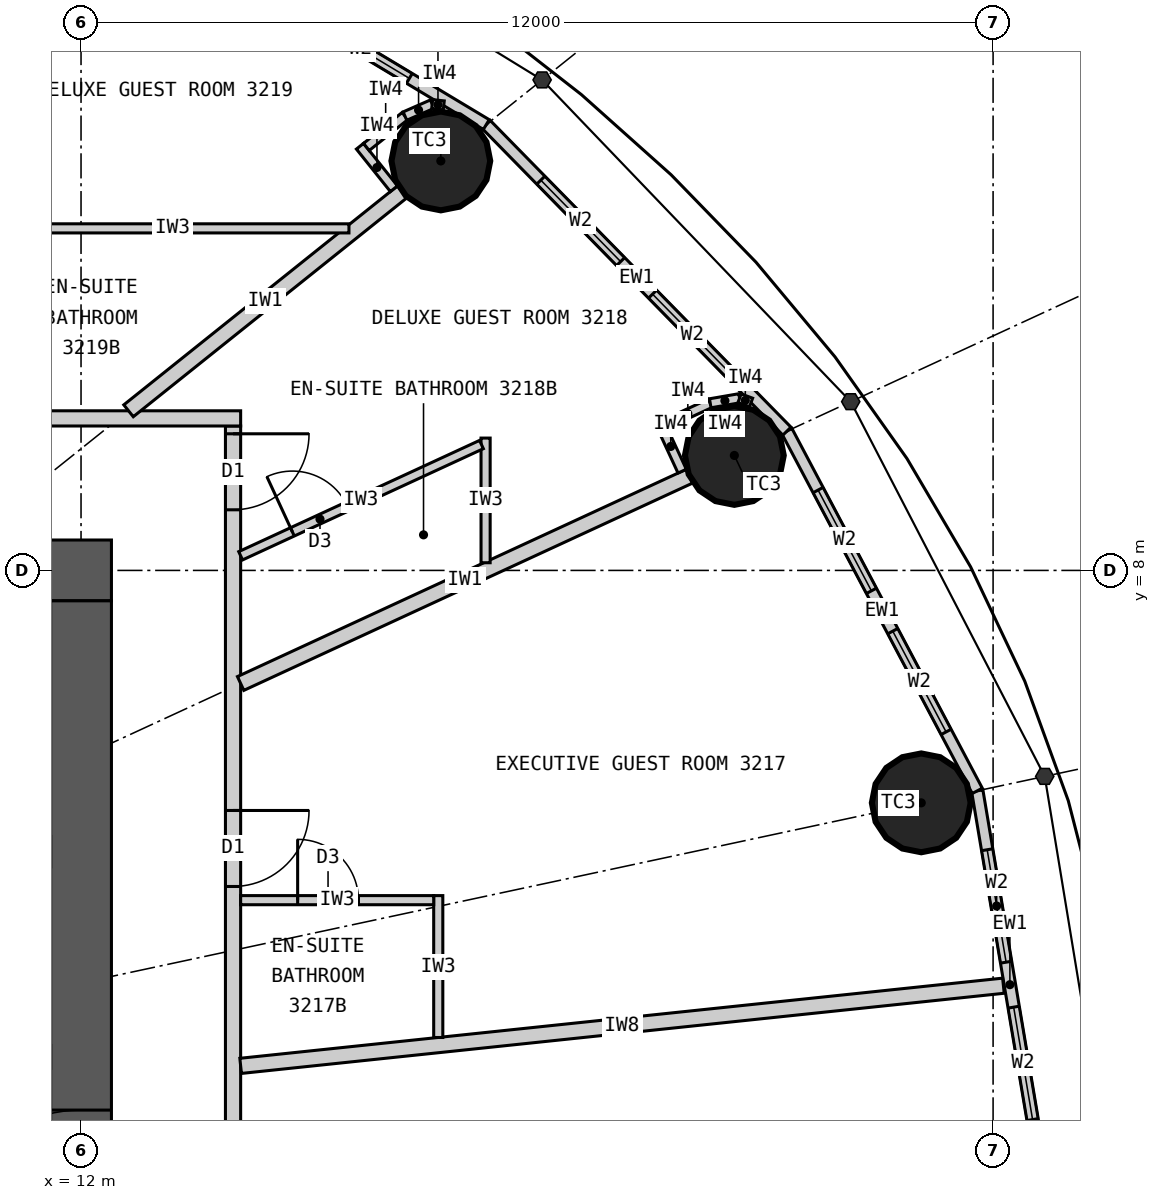
"""IFC4 building model, lengths in metres.
Left out: names, types, materials, properties, quantities, classifications, styles, units other than length and angle.
Written with IfcOpenShell. Run it as: python <this file> out.ifc"""

import sys

from ifc_helpers import new_model, si_unit, direction, frame, frame_2d, origin, origin_2d, place, context, subcontext, project, spatial, rectangle, circle, extrude, element, fill, save


model = new_model("IFC4")
c1 = context("Model", 3, precision=1e-05, world=origin(), true_north=direction((0.0, 1.0)))
c2 = subcontext(c1, "Body", "Model", "MODEL_VIEW")
j1 = project(units=[si_unit("LENGTHUNIT", "METRE"), si_unit("PLANEANGLEUNIT", "RADIAN")], contexts=[c1])
p1 = place(None, origin())
s1 = spatial("IfcSite", under=j1, at=p1, CompositionType="ELEMENT")
p2 = place(p1, origin())
s2 = spatial("IfcBuilding", under=s1, at=p2, CompositionType="ELEMENT")
p3 = place(p2, frame((0.0, 0.0, 125.4)))
s3 = spatial("IfcBuildingStorey", under=s2, at=p3, CompositionType="ELEMENT", Elevation=125.4)
for number, where, z_axis, x_axis in (
    (1, (23.055, 4.942, 0.0), (0.0, 0.0, 1.0), (1.0, 0.0, 0.0)),
    (2, (20.596, 9.513, 0.0), (0.0, 0.0, 1.0), (1.0, 0.0, 0.0)),
    (3, (16.734, 13.387, 0.0), (0.0, 0.0, 1.0), (1.0, 0.0, 0.0)),
):
    element("IfcColumn", number, at=place(p3, frame(where, z_axis=z_axis, x_axis=x_axis)), inside=s3, PredefinedType="COLUMN", context=c2, shape_type="SweptSolid", body=[
        extrude(circle(Radius=0.65, at=origin_2d()), origin(), (0.0, 0.0, 1.0), 3.3),
    ])
p4 = place(p3, frame((-12.4, 8.0, 0.0), z_axis=(0.0, 0.0, 1.0), x_axis=(1.0, 0.0, 0.0)))
e4 = element("IfcWall", 4, at=p4, inside=s3, PredefinedType="SHEAR", context=c2, shape_type="SweptSolid", body=[
    extrude(rectangle(XDim=24.8, YDim=0.8, at=frame_2d((12.4, 0.0))), origin(), (0.0, 0.0, 1.0), 3.3),
])
p5 = place(p4, frame((11.1, 0.0, 0.0)))
e5 = element("IfcOpeningElement", 5, at=p5, cuts=e4, PredefinedType="OPENING", context=c2, shape_type="SweptSolid", body=[
    extrude(rectangle(XDim=1.2, YDim=2.2, at=frame_2d((0.6, 1.1))), frame((0.0, 0.41, 0.0), z_axis=(0.0, -1.0, 0.0), x_axis=(1.0, 0.0, 0.0)), (0.0, 0.0, 1.0), 0.82),
])
p6 = place(p4, frame((18.7, 0.0, 0.0)))
e6 = element("IfcOpeningElement", 6, at=p6, cuts=e4, PredefinedType="OPENING", context=c2, shape_type="SweptSolid", body=[
    extrude(rectangle(XDim=0.9, YDim=2.2, at=frame_2d((0.45, 1.1))), frame((0.0, 0.41, 0.0), z_axis=(0.0, -1.0, 0.0), x_axis=(1.0, 0.0, 0.0)), (0.0, 0.0, 1.0), 0.82),
])
p7 = place(p3, frame((12.0, -7.6, 0.0), z_axis=(0.0, 0.0, 1.0), x_axis=(0.0, 1.0, 0.0)))
e7 = element("IfcWall", 7, at=p7, inside=s3, PredefinedType="SHEAR", context=c2, shape_type="SweptSolid", body=[
    extrude(rectangle(XDim=15.2, YDim=0.8, at=frame_2d((7.6, 0.0))), origin(), (0.0, 0.0, 1.0), 3.3),
])
p8 = place(p7, frame((6.7, 0.0, 0.0)))
e8 = element("IfcOpeningElement", 8, at=p8, cuts=e7, PredefinedType="OPENING", context=c2, shape_type="SweptSolid", body=[
    extrude(rectangle(XDim=1.8, YDim=2.2, at=frame_2d((0.9, 1.1))), frame((0.0, 0.41, 0.0), z_axis=(0.0, -1.0, 0.0), x_axis=(1.0, 0.0, 0.0)), (0.0, 0.0, 1.0), 0.82),
])
p9 = place(p3, frame((24.65, 0.0, 0.0), z_axis=(0.0, 0.0, 1.0), x_axis=(-0.165883894218, 0.986145290329, 0.0)))
e9 = element("IfcWall", 9, at=p9, inside=s3, PredefinedType="ELEMENTEDWALL", context=c2, shape_type="SweptSolid", body=[
    extrude(rectangle(XDim=5.172, YDim=0.15, at=frame_2d((2.586, 0.0))), origin(), (0.0, 0.0, 1.0), 3.12),
])
p10 = place(p9, frame((0.786, 0.0, 0.9)))
e10 = element("IfcOpeningElement", 10, at=p10, cuts=e9, PredefinedType="OPENING", context=c2, shape_type="SweptSolid", body=[
    extrude(rectangle(XDim=1.5, YDim=1.9, at=frame_2d((0.75, 0.95))), frame((0.0, 0.085, 0.0), z_axis=(0.0, -1.0, 0.0), x_axis=(1.0, 0.0, 0.0)), (0.0, 0.0, 1.0), 0.17),
])
p11 = place(p9, frame((2.886, 0.0, 0.9)))
e11 = element("IfcOpeningElement", 11, at=p11, cuts=e9, PredefinedType="OPENING", context=c2, shape_type="SweptSolid", body=[
    extrude(rectangle(XDim=1.5, YDim=1.9, at=frame_2d((0.75, 0.95))), frame((0.0, 0.085, 0.0), z_axis=(0.0, -1.0, 0.0), x_axis=(1.0, 0.0, 0.0)), (0.0, 0.0, 1.0), 0.17),
])
p12 = place(p3, frame((23.792, 5.1, 0.0), z_axis=(0.0, 0.0, 1.0), x_axis=(-0.467814388454, 0.883826735257, 0.0)))
e12 = element("IfcWall", 12, at=p12, inside=s3, PredefinedType="ELEMENTEDWALL", context=c2, shape_type="SweptSolid", body=[
    extrude(rectangle(XDim=5.354, YDim=0.15, at=frame_2d((2.677, 0.0))), origin(), (0.0, 0.0, 1.0), 3.12),
])
p13 = place(p12, frame((0.877, 0.0, 0.9)))
e13 = element("IfcOpeningElement", 13, at=p13, cuts=e12, PredefinedType="OPENING", context=c2, shape_type="SweptSolid", body=[
    extrude(rectangle(XDim=1.5, YDim=1.9, at=frame_2d((0.75, 0.95))), frame((0.0, 0.085, 0.0), z_axis=(0.0, -1.0, 0.0), x_axis=(1.0, 0.0, 0.0)), (0.0, 0.0, 1.0), 0.17),
])
p14 = place(p12, frame((2.977, 0.0, 0.9)))
e14 = element("IfcOpeningElement", 14, at=p14, cuts=e12, PredefinedType="OPENING", context=c2, shape_type="SweptSolid", body=[
    extrude(rectangle(XDim=1.5, YDim=1.9, at=frame_2d((0.75, 0.95))), frame((0.0, 0.085, 0.0), z_axis=(0.0, -1.0, 0.0), x_axis=(1.0, 0.0, 0.0)), (0.0, 0.0, 1.0), 0.17),
])
p15 = place(p3, frame((21.287, 9.832, 0.0), z_axis=(0.0, 0.0, 1.0), x_axis=(-0.700136650834, 0.714008872605, 0.0)))
e15 = element("IfcWall", 15, at=p15, inside=s3, PredefinedType="ELEMENTEDWALL", context=c2, shape_type="SweptSolid", body=[
    extrude(rectangle(XDim=5.649, YDim=0.15, at=frame_2d((2.825, 0.0))), origin(), (0.0, 0.0, 1.0), 3.12),
])
p16 = place(p15, frame((1.025, 0.0, 0.9)))
e16 = element("IfcOpeningElement", 16, at=p16, cuts=e15, PredefinedType="OPENING", context=c2, shape_type="SweptSolid", body=[
    extrude(rectangle(XDim=1.5, YDim=1.9, at=frame_2d((0.75, 0.95))), frame((0.0, 0.085, 0.0), z_axis=(0.0, -1.0, 0.0), x_axis=(1.0, 0.0, 0.0)), (0.0, 0.0, 1.0), 0.17),
])
p17 = place(p15, frame((3.125, 0.0, 0.9)))
e17 = element("IfcOpeningElement", 17, at=p17, cuts=e15, PredefinedType="OPENING", context=c2, shape_type="SweptSolid", body=[
    extrude(rectangle(XDim=1.5, YDim=1.9, at=frame_2d((0.75, 0.95))), frame((0.0, 0.085, 0.0), z_axis=(0.0, -1.0, 0.0), x_axis=(1.0, 0.0, 0.0)), (0.0, 0.0, 1.0), 0.17),
])
p18 = place(p3, frame((17.332, 13.866, 0.0), z_axis=(0.0, 0.0, 1.0), x_axis=(-0.857308573723, 0.514802884044, 0.0)))
e18 = element("IfcWall", 18, at=p18, inside=s3, PredefinedType="ELEMENTEDWALL", context=c2, shape_type="SweptSolid", body=[
    extrude(rectangle(XDim=5.961, YDim=0.15, at=frame_2d((2.98, 0.0))), origin(), (0.0, 0.0, 1.0), 3.12),
])
p19 = place(p18, frame((1.181, 0.0, 0.9)))
e19 = element("IfcOpeningElement", 19, at=p19, cuts=e18, PredefinedType="OPENING", context=c2, shape_type="SweptSolid", body=[
    extrude(rectangle(XDim=1.5, YDim=1.9, at=frame_2d((0.75, 0.95))), frame((0.0, 0.085, 0.0), z_axis=(0.0, -1.0, 0.0), x_axis=(1.0, 0.0, 0.0)), (0.0, 0.0, 1.0), 0.17),
])
p20 = place(p18, frame((3.281, 0.0, 0.9)))
e20 = element("IfcOpeningElement", 20, at=p20, cuts=e18, PredefinedType="OPENING", context=c2, shape_type="SweptSolid", body=[
    extrude(rectangle(XDim=1.5, YDim=1.9, at=frame_2d((0.75, 0.95))), frame((0.0, 0.085, 0.0), z_axis=(0.0, -1.0, 0.0), x_axis=(1.0, 0.0, 0.0)), (0.0, 0.0, 1.0), 0.17),
])
p21 = place(p3, frame((14.0, -9.9, 0.0), z_axis=(0.0, 0.0, 1.0), x_axis=(0.0, 1.0, 0.0)))
e21 = element("IfcWall", 21, at=p21, inside=s3, PredefinedType="PARTITIONING", context=c2, shape_type="SweptSolid", body=[
    extrude(rectangle(XDim=19.8, YDim=0.2, at=frame_2d((9.9, 0.0))), origin(), (0.0, 0.0, 1.0), 3.12),
])
p22 = place(p21, frame((2.478, 0.0, 0.0)))
e22 = element("IfcOpeningElement", 22, at=p22, cuts=e21, PredefinedType="OPENING", context=c2, shape_type="SweptSolid", body=[
    extrude(rectangle(XDim=1.0, YDim=2.2, at=frame_2d((0.5, 1.1))), frame((0.0, 0.11, 0.0), z_axis=(0.0, -1.0, 0.0), x_axis=(1.0, 0.0, 0.0)), (0.0, 0.0, 1.0), 0.22),
])
p23 = place(p21, frame((8.838, 0.0, 0.0)))
e23 = element("IfcOpeningElement", 23, at=p23, cuts=e21, PredefinedType="OPENING", context=c2, shape_type="SweptSolid", body=[
    extrude(rectangle(XDim=1.0, YDim=2.2, at=frame_2d((0.5, 1.1))), frame((0.0, 0.11, 0.0), z_axis=(0.0, -1.0, 0.0), x_axis=(1.0, 0.0, 0.0)), (0.0, 0.0, 1.0), 0.22),
])
p24 = place(p21, frame((13.742, 0.0, 0.0)))
e24 = element("IfcOpeningElement", 24, at=p24, cuts=e21, PredefinedType="OPENING", context=c2, shape_type="SweptSolid", body=[
    extrude(rectangle(XDim=1.0, YDim=2.2, at=frame_2d((0.5, 1.1))), frame((0.0, 0.11, 0.0), z_axis=(0.0, -1.0, 0.0), x_axis=(1.0, 0.0, 0.0)), (0.0, 0.0, 1.0), 0.22),
])
p25 = place(p21, frame((18.698, 0.0, 0.0)))
e25 = element("IfcOpeningElement", 25, at=p25, cuts=e21, PredefinedType="OPENING", context=c2, shape_type="SweptSolid", body=[
    extrude(rectangle(XDim=1.0, YDim=2.2, at=frame_2d((0.5, 1.1))), frame((0.0, 0.11, 0.0), z_axis=(0.0, -1.0, 0.0), x_axis=(1.0, 0.0, 0.0)), (0.0, 0.0, 1.0), 0.22),
])
p26 = place(p3, frame((3.283, 10.0, 0.0), z_axis=(0.0, 0.0, 1.0), x_axis=(1.0, 0.0, 0.0)))
e26 = element("IfcWall", 26, at=p26, inside=s3, PredefinedType="PARTITIONING", context=c2, shape_type="SweptSolid", body=[
    extrude(rectangle(XDim=10.817, YDim=0.2, at=frame_2d((5.409, 0.0))), origin(), (0.0, 0.0, 1.0), 3.12),
])
p27 = place(p26, frame((6.482, 0.0, 0.0)))
e27 = element("IfcOpeningElement", 27, at=p27, cuts=e26, PredefinedType="OPENING", context=c2, shape_type="SweptSolid", body=[
    extrude(rectangle(XDim=1.0, YDim=2.2, at=frame_2d((0.5, 1.1))), frame((0.0, 0.11, 0.0), z_axis=(0.0, -1.0, 0.0), x_axis=(1.0, 0.0, 0.0)), (0.0, 0.0, 1.0), 0.22),
])
p28 = place(p3, frame((14.1, 1.482, 0.0), z_axis=(0.0, 0.0, 1.0), x_axis=(0.994523202615, 0.104516024894, 0.0)))
e28 = element("IfcWall", 28, at=p28, inside=s3, PredefinedType="PARTITIONING", context=c2, shape_type="SweptSolid", body=[
    extrude(rectangle(XDim=10.091, YDim=0.2, at=frame_2d((5.045, 0.0))), origin(), (0.0, 0.0, 1.0), 2.47),
])
p29 = place(p3, frame((14.1, 6.512, 0.0), z_axis=(0.0, 0.0, 1.0), x_axis=(0.907833019998, 0.419331858797, 0.0)))
e29 = element("IfcWall", 29, at=p29, inside=s3, PredefinedType="PARTITIONING", context=c2, shape_type="SweptSolid", body=[
    extrude(rectangle(XDim=6.505, YDim=0.2, at=frame_2d((3.252, 0.0))), origin(), (0.0, 0.0, 1.0), 2.27),
])
p30 = place(p3, frame((12.625, 10.1, 0.0), z_axis=(0.0, 0.0, 1.0), x_axis=(0.780863644897, 0.624701503182, 0.0)))
e30 = element("IfcWall", 30, at=p30, inside=s3, PredefinedType="PARTITIONING", context=c2, shape_type="SweptSolid", body=[
    extrude(rectangle(XDim=4.612, YDim=0.2, at=frame_2d((2.306, 0.0))), origin(), (0.0, 0.0, 1.0), 2.37),
])
p31 = place(p3, frame((16.7, 1.855, 0.0), z_axis=(0.0, 0.0, 1.0), x_axis=(0.0, 1.0, 0.0)))
e31 = element("IfcWall", 31, at=p31, inside=s3, PredefinedType="PARTITIONING", context=c2, shape_type="SweptSolid", body=[
    extrude(rectangle(XDim=1.867, YDim=0.12, at=frame_2d((0.933, 0.0))), origin(), (0.0, 0.0, 1.0), 3.12),
])
p32 = place(p3, frame((14.1, 3.662, 0.0), z_axis=(0.0, 0.0, 1.0), x_axis=(1.0, 0.0, 0.0)))
e32 = element("IfcWall", 32, at=p32, inside=s3, PredefinedType="PARTITIONING", context=c2, shape_type="SweptSolid", body=[
    extrude(rectangle(XDim=2.54, YDim=0.12, at=frame_2d((1.27, 0.0))), origin(), (0.0, 0.0, 1.0), 2.37),
])
p33 = place(p32, frame((0.75, 0.0, 0.0)))
e33 = element("IfcOpeningElement", 33, at=p33, cuts=e32, PredefinedType="OPENING", context=c2, shape_type="SweptSolid", body=[
    extrude(rectangle(XDim=0.8, YDim=2.1, at=frame_2d((0.4, 1.05))), frame((0.0, 0.07, 0.0), z_axis=(0.0, -1.0, 0.0), x_axis=(1.0, 0.0, 0.0)), (0.0, 0.0, 1.0), 0.14),
])
p34 = place(p3, frame((17.323, 8.101, 0.0), z_axis=(0.0, 0.0, 1.0), x_axis=(0.0, 1.0, 0.0)))
e34 = element("IfcWall", 34, at=p34, inside=s3, PredefinedType="PARTITIONING", context=c2, shape_type="SweptSolid", body=[
    extrude(rectangle(XDim=1.64, YDim=0.12, at=frame_2d((0.82, 0.0))), origin(), (0.0, 0.0, 1.0), 3.12),
])
p35 = place(p3, frame((14.1, 8.193, 0.0), z_axis=(0.0, 0.0, 1.0), x_axis=(0.907836493557, 0.419324338628, 0.0)))
e35 = element("IfcWall", 35, at=p35, inside=s3, PredefinedType="PARTITIONING", context=c2, shape_type="SweptSolid", body=[
    extrude(rectangle(XDim=3.49, YDim=0.12, at=frame_2d((1.745, 0.0))), origin(), (0.0, 0.0, 1.0), 3.12),
])
p36 = place(p35, frame((0.75, 0.0, 0.0)))
e36 = element("IfcOpeningElement", 36, at=p36, cuts=e35, PredefinedType="OPENING", context=c2, shape_type="SweptSolid", body=[
    extrude(rectangle(XDim=0.8, YDim=2.1, at=frame_2d((0.4, 1.05))), frame((0.0, 0.07, 0.0), z_axis=(0.0, -1.0, 0.0), x_axis=(1.0, 0.0, 0.0)), (0.0, 0.0, 1.0), 0.14),
])
p37 = place(p3, frame((15.525, 12.5, 0.0), z_axis=(0.0, 0.0, 1.0), x_axis=(-1.0, 0.0, 0.0)))
e37 = element("IfcWall", 37, at=p37, inside=s3, PredefinedType="PARTITIONING", context=c2, shape_type="SweptSolid", body=[
    extrude(rectangle(XDim=4.64, YDim=0.12, at=frame_2d((2.32, 0.0))), origin(), (0.0, 0.0, 1.0), 3.12),
])
p38 = place(p3, frame((19.909, 9.306, 0.0), z_axis=(0.0, 0.0, 1.0), x_axis=(-0.419296148934, 0.90784951368, 0.0)))
e38 = element("IfcWall", 38, at=p38, inside=s3, PredefinedType="PARTITIONING", context=c2, shape_type="SweptSolid", body=[
    extrude(rectangle(XDim=0.716, YDim=0.12, at=frame_2d((0.358, 0.0))), origin(), (0.0, 0.0, 1.0), 3.12),
])
p39 = place(p3, frame((19.689, 9.926, 0.0), z_axis=(0.0, 0.0, 1.0), x_axis=(0.907893409272, 0.419201094227, 0.0)))
e39 = element("IfcWall", 39, at=p39, inside=s3, PredefinedType="PARTITIONING", context=c2, shape_type="SweptSolid", body=[
    extrude(rectangle(XDim=0.65, YDim=0.12, at=frame_2d((0.325, 0.0))), origin(), (0.0, 0.0, 1.0), 3.12),
])
p40 = place(p3, frame((20.279, 10.199, 0.0), z_axis=(0.0, 0.0, 1.0), x_axis=(0.985380740712, 0.170366651181, 0.0)))
e40 = element("IfcWall", 40, at=p40, inside=s3, PredefinedType="PARTITIONING", context=c2, shape_type="SweptSolid", body=[
    extrude(rectangle(XDim=0.391, YDim=0.12, at=frame_2d((0.196, 0.0))), origin(), (0.0, 0.0, 1.0), 3.12),
])
p41 = place(p3, frame((20.664, 10.265, 0.0), z_axis=(0.0, 0.0, 1.0), x_axis=(0.938058651481, -0.346476501918, 0.0)))
e41 = element("IfcWall", 41, at=p41, inside=s3, PredefinedType="PARTITIONING", context=c2, shape_type="SweptSolid", body=[
    extrude(rectangle(XDim=0.161, YDim=0.12, at=frame_2d((0.081, 0.0))), origin(), (0.0, 0.0, 1.0), 3.12),
])
p42 = place(p3, frame((16.117, 13.022, 0.0), z_axis=(0.0, 0.0, 1.0), x_axis=(-0.62465344249, 0.780902091677, 0.0)))
e42 = element("IfcWall", 42, at=p42, inside=s3, PredefinedType="PARTITIONING", context=c2, shape_type="SweptSolid", body=[
    extrude(rectangle(XDim=0.716, YDim=0.12, at=frame_2d((0.358, 0.0))), origin(), (0.0, 0.0, 1.0), 3.12),
])
p43 = place(p3, frame((15.754, 13.571, 0.0), z_axis=(0.0, 0.0, 1.0), x_axis=(0.780905453553, 0.624649239663, 0.0)))
e43 = element("IfcWall", 43, at=p43, inside=s3, PredefinedType="PARTITIONING", context=c2, shape_type="SweptSolid", body=[
    extrude(rectangle(XDim=0.65, YDim=0.12, at=frame_2d((0.325, 0.0))), origin(), (0.0, 0.0, 1.0), 3.12),
])
p44 = place(p3, frame((16.262, 13.977, 0.0), z_axis=(0.0, 0.0, 1.0), x_axis=(0.915985403703, 0.401211590314, 0.0)))
e44 = element("IfcWall", 44, at=p44, inside=s3, PredefinedType="PARTITIONING", context=c2, shape_type="SweptSolid", body=[
    extrude(rectangle(XDim=0.391, YDim=0.12, at=frame_2d((0.196, 0.0))), origin(), (0.0, 0.0, 1.0), 3.12),
])
p45 = place(p3, frame((16.62, 14.134, 0.0), z_axis=(0.0, 0.0, 1.0), x_axis=(0.993941871493, -0.109907033867, 0.0)))
e45 = element("IfcWall", 45, at=p45, inside=s3, PredefinedType="PARTITIONING", context=c2, shape_type="SweptSolid", body=[
    extrude(rectangle(XDim=0.153, YDim=0.12, at=frame_2d((0.077, 0.0))), origin(), (0.0, 0.0, 1.0), 3.12),
])
p46 = place(p10, origin())
e46 = element("IfcWindow", 46, at=p46, inside=s3, PartitioningType="SINGLE_PANEL", PredefinedType="WINDOW", context=c2, shape_type="SweptSolid", body=[
    extrude(rectangle(XDim=1.5, YDim=1.9, at=frame_2d((0.75, 0.95))), frame((0.0, 0.03, 0.0), z_axis=(0.0, -1.0, 0.0), x_axis=(1.0, 0.0, 0.0)), (0.0, 0.0, 1.0), 0.06),
])
fill(e10, e46)
p47 = place(p11, origin())
e47 = element("IfcWindow", 47, at=p47, inside=s3, PartitioningType="SINGLE_PANEL", PredefinedType="WINDOW", context=c2, shape_type="SweptSolid", body=[
    extrude(rectangle(XDim=1.5, YDim=1.9, at=frame_2d((0.75, 0.95))), frame((0.0, 0.03, 0.0), z_axis=(0.0, -1.0, 0.0), x_axis=(1.0, 0.0, 0.0)), (0.0, 0.0, 1.0), 0.06),
])
fill(e11, e47)
p48 = place(p13, origin())
e48 = element("IfcWindow", 48, at=p48, inside=s3, PartitioningType="SINGLE_PANEL", PredefinedType="WINDOW", context=c2, shape_type="SweptSolid", body=[
    extrude(rectangle(XDim=1.5, YDim=1.9, at=frame_2d((0.75, 0.95))), frame((0.0, 0.03, 0.0), z_axis=(0.0, -1.0, 0.0), x_axis=(1.0, 0.0, 0.0)), (0.0, 0.0, 1.0), 0.06),
])
fill(e13, e48)
p49 = place(p14, origin())
e49 = element("IfcWindow", 49, at=p49, inside=s3, PartitioningType="SINGLE_PANEL", PredefinedType="WINDOW", context=c2, shape_type="SweptSolid", body=[
    extrude(rectangle(XDim=1.5, YDim=1.9, at=frame_2d((0.75, 0.95))), frame((0.0, 0.03, 0.0), z_axis=(0.0, -1.0, 0.0), x_axis=(1.0, 0.0, 0.0)), (0.0, 0.0, 1.0), 0.06),
])
fill(e14, e49)
p50 = place(p16, origin())
e50 = element("IfcWindow", 50, at=p50, inside=s3, PartitioningType="SINGLE_PANEL", PredefinedType="WINDOW", context=c2, shape_type="SweptSolid", body=[
    extrude(rectangle(XDim=1.5, YDim=1.9, at=frame_2d((0.75, 0.95))), frame((0.0, 0.03, 0.0), z_axis=(0.0, -1.0, 0.0), x_axis=(1.0, 0.0, 0.0)), (0.0, 0.0, 1.0), 0.06),
])
fill(e16, e50)
p51 = place(p17, origin())
e51 = element("IfcWindow", 51, at=p51, inside=s3, PartitioningType="SINGLE_PANEL", PredefinedType="WINDOW", context=c2, shape_type="SweptSolid", body=[
    extrude(rectangle(XDim=1.5, YDim=1.9, at=frame_2d((0.75, 0.95))), frame((0.0, 0.03, 0.0), z_axis=(0.0, -1.0, 0.0), x_axis=(1.0, 0.0, 0.0)), (0.0, 0.0, 1.0), 0.06),
])
fill(e17, e51)
p52 = place(p19, origin())
e52 = element("IfcWindow", 52, at=p52, inside=s3, PartitioningType="SINGLE_PANEL", PredefinedType="WINDOW", context=c2, shape_type="SweptSolid", body=[
    extrude(rectangle(XDim=1.5, YDim=1.9, at=frame_2d((0.75, 0.95))), frame((0.0, 0.03, 0.0), z_axis=(0.0, -1.0, 0.0), x_axis=(1.0, 0.0, 0.0)), (0.0, 0.0, 1.0), 0.06),
])
fill(e19, e52)
p53 = place(p33, origin())
e53 = element("IfcDoor", 53, at=p53, inside=s3, OperationType="SINGLE_SWING_LEFT", PredefinedType="DOOR", context=c2, shape_type="SweptSolid", body=[
    extrude(rectangle(XDim=0.8, YDim=2.1, at=frame_2d((0.4, 1.05))), frame((0.0, 0.025, 0.0), z_axis=(0.0, -1.0, 0.0), x_axis=(1.0, 0.0, 0.0)), (0.0, 0.0, 1.0), 0.05),
])
fill(e33, e53)
p54 = place(p24, origin())
e54 = element("IfcDoor", 54, at=p54, inside=s3, OperationType="SINGLE_SWING_RIGHT", PredefinedType="DOOR", context=c2, shape_type="SweptSolid", body=[
    extrude(rectangle(XDim=1.0, YDim=2.2, at=frame_2d((0.5, 1.1))), frame((0.0, 0.025, 0.0), z_axis=(0.0, -1.0, 0.0), x_axis=(1.0, 0.0, 0.0)), (0.0, 0.0, 1.0), 0.05),
])
fill(e24, e54)
p55 = place(p36, origin())
e55 = element("IfcDoor", 55, at=p55, inside=s3, OperationType="SINGLE_SWING_LEFT", PredefinedType="DOOR", context=c2, shape_type="SweptSolid", body=[
    extrude(rectangle(XDim=0.8, YDim=2.1, at=frame_2d((0.4, 1.05))), frame((0.0, 0.025, 0.0), z_axis=(0.0, -1.0, 0.0), x_axis=(1.0, 0.0, 0.0)), (0.0, 0.0, 1.0), 0.05),
])
fill(e36, e55)
p56 = place(p25, origin())
e56 = element("IfcDoor", 56, at=p56, inside=s3, OperationType="SINGLE_SWING_RIGHT", PredefinedType="DOOR", context=c2, shape_type="SweptSolid", body=[
    extrude(rectangle(XDim=1.0, YDim=2.2, at=frame_2d((0.5, 1.1))), frame((0.0, 0.025, 0.0), z_axis=(0.0, -1.0, 0.0), x_axis=(1.0, 0.0, 0.0)), (0.0, 0.0, 1.0), 0.05),
])
fill(e25, e56)
p57 = place(p8, origin())
e57 = element("IfcDoor", 57, at=p57, inside=s3, OperationType="DOUBLE_DOOR_DOUBLE_SWING", PredefinedType="DOOR", context=c2, shape_type="SweptSolid", body=[
    extrude(rectangle(XDim=1.8, YDim=2.2, at=frame_2d((0.9, 1.1))), frame((0.0, 0.025, 0.0), z_axis=(0.0, -1.0, 0.0), x_axis=(1.0, 0.0, 0.0)), (0.0, 0.0, 1.0), 0.05),
])
fill(e8, e57)
save(model, sys.argv[1])
